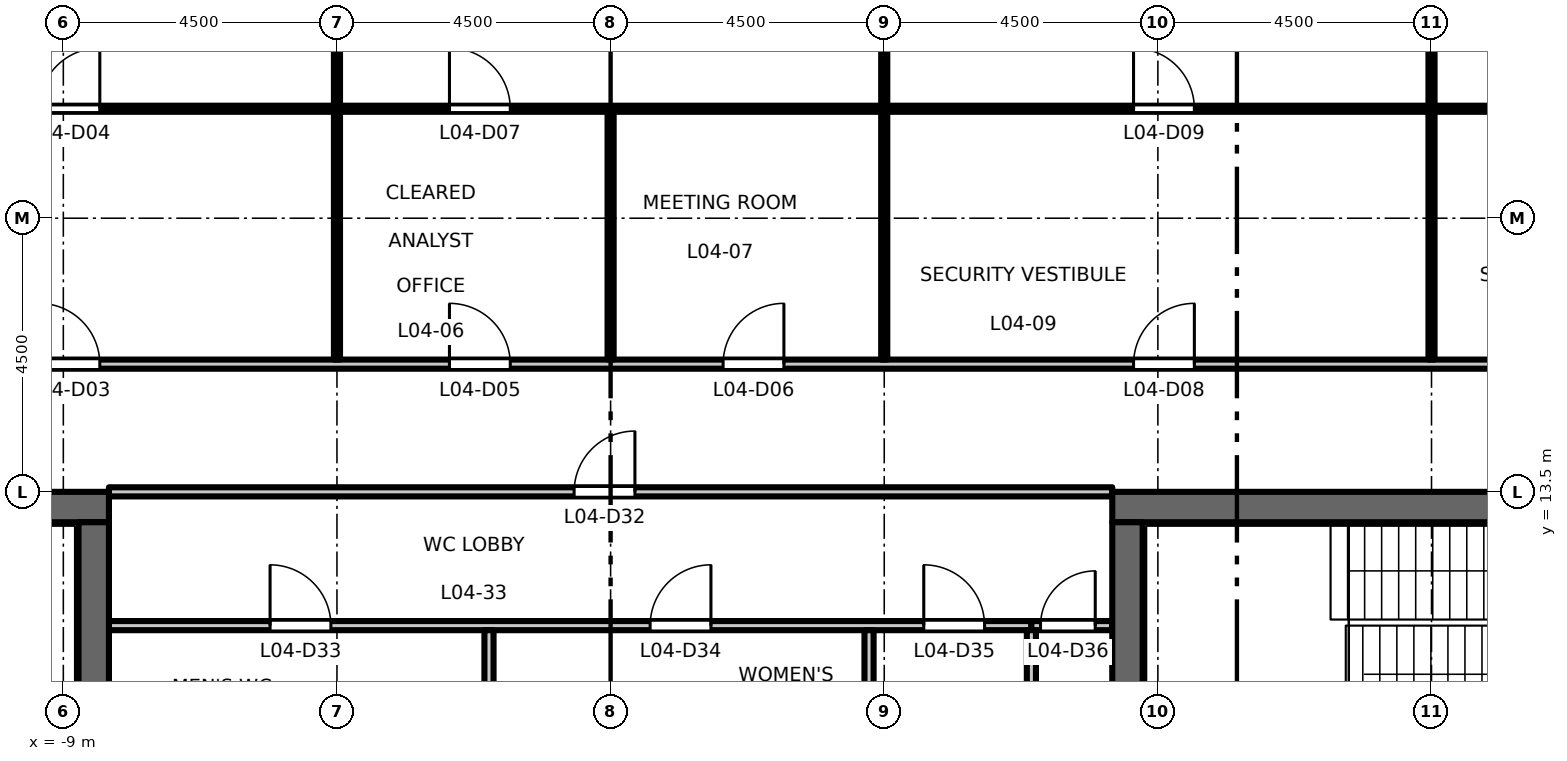
"""IFC4 building model, lengths in metres.
Left out: names, types, materials, properties, quantities, classifications, styles, units other than length and angle.
Written with IfcOpenShell. Run it as: python <this file> out.ifc"""

import sys

from ifc_helpers import new_model, si_unit, direction, frame, frame_2d, origin, place, context, subcontext, project, spatial, rectangle, extrude, element, fill, save


model = new_model("IFC4")
c1 = context("Model", 3, precision=1e-05, world=origin(), true_north=direction((0.0, 1.0)))
c2 = subcontext(c1, "Body", "Model", "MODEL_VIEW")
j1 = project(units=[si_unit("LENGTHUNIT", "METRE"), si_unit("PLANEANGLEUNIT", "RADIAN")], contexts=[c1])
p1 = place(None, origin())
s1 = spatial("IfcSite", under=j1, at=p1, CompositionType="ELEMENT")
p2 = place(p1, origin())
s2 = spatial("IfcBuilding", under=s1, at=p2, CompositionType="ELEMENT")
p3 = place(p2, frame((0.0, 0.0, 22.2)))
s3 = spatial("IfcBuildingStorey", under=s2, at=p3, CompositionType="ELEMENT", Elevation=22.2)
p4 = place(p3, frame((-8.25, 13.25, 0.0), z_axis=(0.0, 0.0, 1.0), x_axis=(-1.0, 0.0, 0.0)))
e1 = element("IfcWall", 1, at=p4, inside=s3, PredefinedType="SHEAR", context=c2, shape_type="SweptSolid", body=[
    extrude(rectangle(XDim=13.5, YDim=0.5, at=frame_2d((6.75, 0.0))), origin(), (0.0, 0.0, 1.0), 4.35),
])
p5 = place(p3, frame((-8.5, -13.0, 0.0), z_axis=(0.0, 0.0, 1.0), x_axis=(0.0, 1.0, 0.0)))
e2 = element("IfcWall", 2, at=p5, inside=s3, PredefinedType="SHEAR", context=c2, shape_type="SweptSolid", body=[
    extrude(rectangle(XDim=26.0, YDim=0.5, at=frame_2d((13.0, 0.0))), origin(), (0.0, 0.0, 1.0), 4.35),
])
p6 = place(p3, frame((8.25, 13.25, 0.0), z_axis=(0.0, 0.0, 1.0), x_axis=(1.0, 0.0, 0.0)))
e3 = element("IfcWall", 3, at=p6, inside=s3, PredefinedType="SHEAR", context=c2, shape_type="SweptSolid", body=[
    extrude(rectangle(XDim=13.5, YDim=0.5, at=frame_2d((6.75, 0.0))), origin(), (0.0, 0.0, 1.0), 4.35),
])
p7 = place(p3, frame((8.5, -13.0, 0.0), z_axis=(0.0, 0.0, 1.0), x_axis=(0.0, 1.0, 0.0)))
e4 = element("IfcWall", 4, at=p7, inside=s3, PredefinedType="SHEAR", context=c2, shape_type="SweptSolid", body=[
    extrude(rectangle(XDim=26.0, YDim=0.5, at=frame_2d((13.0, 0.0))), origin(), (0.0, 0.0, 1.0), 4.35),
])
p8 = place(p3, frame((-8.25, 11.3, 0.0), z_axis=(0.0, 0.0, 1.0), x_axis=(1.0, 0.0, 0.0)))
e5 = element("IfcWall", 5, at=p8, inside=s3, PredefinedType="PARTITIONING", context=c2, shape_type="SweptSolid", body=[
    extrude(rectangle(XDim=15.17, YDim=0.15, at=frame_2d((7.585, 0.0))), origin(), (0.0, 0.0, 1.0), 4.35),
])
p9 = place(p8, frame((2.65, 0.0, 0.0)))
e6 = element("IfcOpeningElement", 6, at=p9, cuts=e5, PredefinedType="OPENING", context=c2, shape_type="SweptSolid", body=[
    extrude(rectangle(XDim=1.0, YDim=2.1, at=frame_2d((0.5, 1.05))), frame((0.0, 0.085, 0.0), z_axis=(0.0, -1.0, 0.0), x_axis=(1.0, 0.0, 0.0)), (0.0, 0.0, 1.0), 0.17),
])
p10 = place(p8, frame((8.9, 0.0, 0.0)))
e7 = element("IfcOpeningElement", 7, at=p10, cuts=e5, PredefinedType="OPENING", context=c2, shape_type="SweptSolid", body=[
    extrude(rectangle(XDim=1.0, YDim=2.1, at=frame_2d((0.5, 1.05))), frame((0.0, 0.085, 0.0), z_axis=(0.0, -1.0, 0.0), x_axis=(1.0, 0.0, 0.0)), (0.0, 0.0, 1.0), 0.17),
])
p11 = place(p8, frame((13.4, 0.0, 0.0)))
e8 = element("IfcOpeningElement", 8, at=p11, cuts=e5, PredefinedType="OPENING", context=c2, shape_type="SweptSolid", body=[
    extrude(rectangle(XDim=1.0, YDim=2.1, at=frame_2d((0.5, 1.05))), frame((0.0, 0.085, 0.0), z_axis=(0.0, -1.0, 0.0), x_axis=(1.0, 0.0, 0.0)), (0.0, 0.0, 1.0), 0.17),
])
p12 = place(p3, frame((6.92, 11.3, 0.0), z_axis=(0.0, 0.0, 1.0), x_axis=(1.0, 0.0, 0.0)))
e9 = element("IfcWall", 9, at=p12, inside=s3, PredefinedType="PARTITIONING", context=c2, shape_type="SweptSolid", body=[
    extrude(rectangle(XDim=1.33, YDim=0.15, at=frame_2d((0.665, 0.0))), origin(), (0.0, 0.0, 1.0), 4.35),
])
p13 = place(p12, frame((0.15, 0.0, 0.0)))
e10 = element("IfcOpeningElement", 10, at=p13, cuts=e9, PredefinedType="OPENING", context=c2, shape_type="SweptSolid", body=[
    extrude(rectangle(XDim=0.9, YDim=2.1, at=frame_2d((0.45, 1.05))), frame((0.0, 0.085, 0.0), z_axis=(0.0, -1.0, 0.0), x_axis=(1.0, 0.0, 0.0)), (0.0, 0.0, 1.0), 0.17),
])
p14 = place(p3, frame((-8.25, 13.5, 0.0), z_axis=(0.0, 0.0, 1.0), x_axis=(1.0, 0.0, 0.0)))
e11 = element("IfcWall", 11, at=p14, inside=s3, PredefinedType="PARTITIONING", context=c2, shape_type="SweptSolid", body=[
    extrude(rectangle(XDim=16.5, YDim=0.15, at=frame_2d((8.25, 0.0))), origin(), (0.0, 0.0, 1.0), 3.85),
])
p15 = place(p14, frame((7.65, 0.0, 0.0)))
e12 = element("IfcOpeningElement", 12, at=p15, cuts=e11, PredefinedType="OPENING", context=c2, shape_type="SweptSolid", body=[
    extrude(rectangle(XDim=1.0, YDim=2.1, at=frame_2d((0.5, 1.05))), frame((0.0, 0.085, 0.0), z_axis=(0.0, -1.0, 0.0), x_axis=(1.0, 0.0, 0.0)), (0.0, 0.0, 1.0), 0.17),
])
p16 = place(p3, frame((-30.51, 15.6, 0.0), z_axis=(0.0, 0.0, 1.0), x_axis=(1.0, 0.0, 0.0)))
e13 = element("IfcWall", 13, at=p16, inside=s3, PredefinedType="PARTITIONING", context=c2, shape_type="SweptSolid", body=[
    extrude(rectangle(XDim=61.02, YDim=0.15, at=frame_2d((30.51, 0.0))), origin(), (0.0, 0.0, 1.0), 4.35),
])
p17 = place(p16, frame((12.11, 0.0, 0.0)))
e14 = element("IfcOpeningElement", 14, at=p17, cuts=e13, PredefinedType="OPENING", context=c2, shape_type="SweptSolid", body=[
    extrude(rectangle(XDim=1.0, YDim=2.1, at=frame_2d((0.5, 1.05))), frame((0.0, 0.085, 0.0), z_axis=(0.0, -1.0, 0.0), x_axis=(1.0, 0.0, 0.0)), (0.0, 0.0, 1.0), 0.17),
])
p18 = place(p16, frame((21.11, 0.0, 0.0)))
e15 = element("IfcOpeningElement", 15, at=p18, cuts=e13, PredefinedType="OPENING", context=c2, shape_type="SweptSolid", body=[
    extrude(rectangle(XDim=1.0, YDim=2.1, at=frame_2d((0.5, 1.05))), frame((0.0, 0.085, 0.0), z_axis=(0.0, -1.0, 0.0), x_axis=(1.0, 0.0, 0.0)), (0.0, 0.0, 1.0), 0.17),
])
p19 = place(p16, frame((27.86, 0.0, 0.0)))
e16 = element("IfcOpeningElement", 16, at=p19, cuts=e13, PredefinedType="OPENING", context=c2, shape_type="SweptSolid", body=[
    extrude(rectangle(XDim=1.0, YDim=2.1, at=frame_2d((0.5, 1.05))), frame((0.0, 0.085, 0.0), z_axis=(0.0, -1.0, 0.0), x_axis=(1.0, 0.0, 0.0)), (0.0, 0.0, 1.0), 0.17),
])
p20 = place(p16, frame((32.36, 0.0, 0.0)))
e17 = element("IfcOpeningElement", 17, at=p20, cuts=e13, PredefinedType="OPENING", context=c2, shape_type="SweptSolid", body=[
    extrude(rectangle(XDim=1.0, YDim=2.1, at=frame_2d((0.5, 1.05))), frame((0.0, 0.085, 0.0), z_axis=(0.0, -1.0, 0.0), x_axis=(1.0, 0.0, 0.0)), (0.0, 0.0, 1.0), 0.17),
])
p21 = place(p16, frame((39.11, 0.0, 0.0)))
e18 = element("IfcOpeningElement", 18, at=p21, cuts=e13, PredefinedType="OPENING", context=c2, shape_type="SweptSolid", body=[
    extrude(rectangle(XDim=1.0, YDim=2.1, at=frame_2d((0.5, 1.05))), frame((0.0, 0.085, 0.0), z_axis=(0.0, -1.0, 0.0), x_axis=(1.0, 0.0, 0.0)), (0.0, 0.0, 1.0), 0.17),
])
p22 = place(p16, frame((48.11, 0.0, 0.0)))
e19 = element("IfcOpeningElement", 19, at=p22, cuts=e13, PredefinedType="OPENING", context=c2, shape_type="SweptSolid", body=[
    extrude(rectangle(XDim=1.0, YDim=2.1, at=frame_2d((0.5, 1.05))), frame((0.0, 0.085, 0.0), z_axis=(0.0, -1.0, 0.0), x_axis=(1.0, 0.0, 0.0)), (0.0, 0.0, 1.0), 0.17),
])
p23 = place(p16, frame((3.61, 0.0, 0.0)))
e20 = element("IfcOpeningElement", 20, at=p23, cuts=e13, PredefinedType="OPENING", context=c2, shape_type="SweptSolid", body=[
    extrude(rectangle(XDim=1.0, YDim=2.1, at=frame_2d((0.5, 1.05))), frame((0.0, 0.085, 0.0), z_axis=(0.0, -1.0, 0.0), x_axis=(1.0, 0.0, 0.0)), (0.0, 0.0, 1.0), 0.17),
])
p24 = place(p16, frame((56.62, 0.0, 0.0)))
e21 = element("IfcOpeningElement", 21, at=p24, cuts=e13, PredefinedType="OPENING", context=c2, shape_type="SweptSolid", body=[
    extrude(rectangle(XDim=1.0, YDim=2.1, at=frame_2d((0.5, 1.05))), frame((0.0, 0.085, 0.0), z_axis=(0.0, -1.0, 0.0), x_axis=(1.0, 0.0, 0.0)), (0.0, 0.0, 1.0), 0.17),
])
p25 = place(p3, frame((-30.51, 19.8, 0.0), z_axis=(0.0, 0.0, 1.0), x_axis=(1.0, 0.0, 0.0)))
e22 = element("IfcWall", 22, at=p25, inside=s3, PredefinedType="PARTITIONING", context=c2, shape_type="SweptSolid", body=[
    extrude(rectangle(XDim=61.02, YDim=0.1, at=frame_2d((30.51, 0.0))), origin(), (0.0, 0.0, 1.0), 4.35),
])
p26 = place(p25, frame((12.11, 0.0, 0.0)))
e23 = element("IfcOpeningElement", 23, at=p26, cuts=e22, PredefinedType="OPENING", context=c2, shape_type="SweptSolid", body=[
    extrude(rectangle(XDim=1.0, YDim=2.1, at=frame_2d((0.5, 1.05))), frame((0.0, 0.06, 0.0), z_axis=(0.0, -1.0, 0.0), x_axis=(1.0, 0.0, 0.0)), (0.0, 0.0, 1.0), 0.12),
])
p27 = place(p25, frame((21.11, 0.0, 0.0)))
e24 = element("IfcOpeningElement", 24, at=p27, cuts=e22, PredefinedType="OPENING", context=c2, shape_type="SweptSolid", body=[
    extrude(rectangle(XDim=1.0, YDim=2.1, at=frame_2d((0.5, 1.05))), frame((0.0, 0.06, 0.0), z_axis=(0.0, -1.0, 0.0), x_axis=(1.0, 0.0, 0.0)), (0.0, 0.0, 1.0), 0.12),
])
p28 = place(p25, frame((27.86, 0.0, 0.0)))
e25 = element("IfcOpeningElement", 25, at=p28, cuts=e22, PredefinedType="OPENING", context=c2, shape_type="SweptSolid", body=[
    extrude(rectangle(XDim=1.0, YDim=2.1, at=frame_2d((0.5, 1.05))), frame((0.0, 0.06, 0.0), z_axis=(0.0, -1.0, 0.0), x_axis=(1.0, 0.0, 0.0)), (0.0, 0.0, 1.0), 0.12),
])
p29 = place(p25, frame((39.11, 0.0, 0.0)))
e26 = element("IfcOpeningElement", 26, at=p29, cuts=e22, PredefinedType="OPENING", context=c2, shape_type="SweptSolid", body=[
    extrude(rectangle(XDim=1.0, YDim=2.1, at=frame_2d((0.5, 1.05))), frame((0.0, 0.06, 0.0), z_axis=(0.0, -1.0, 0.0), x_axis=(1.0, 0.0, 0.0)), (0.0, 0.0, 1.0), 0.12),
])
p30 = place(p25, frame((48.11, 0.0, 0.0)))
e27 = element("IfcOpeningElement", 27, at=p30, cuts=e22, PredefinedType="OPENING", context=c2, shape_type="SweptSolid", body=[
    extrude(rectangle(XDim=1.0, YDim=2.1, at=frame_2d((0.5, 1.05))), frame((0.0, 0.06, 0.0), z_axis=(0.0, -1.0, 0.0), x_axis=(1.0, 0.0, 0.0)), (0.0, 0.0, 1.0), 0.12),
])
p31 = place(p25, frame((3.61, 0.0, 0.0)))
e28 = element("IfcOpeningElement", 28, at=p31, cuts=e22, PredefinedType="OPENING", context=c2, shape_type="SweptSolid", body=[
    extrude(rectangle(XDim=1.0, YDim=2.1, at=frame_2d((0.5, 1.05))), frame((0.0, 0.06, 0.0), z_axis=(0.0, -1.0, 0.0), x_axis=(1.0, 0.0, 0.0)), (0.0, 0.0, 1.0), 0.12),
])
p32 = place(p25, frame((56.62, 0.0, 0.0)))
e29 = element("IfcOpeningElement", 29, at=p32, cuts=e22, PredefinedType="OPENING", context=c2, shape_type="SweptSolid", body=[
    extrude(rectangle(XDim=1.0, YDim=2.1, at=frame_2d((0.5, 1.05))), frame((0.0, 0.06, 0.0), z_axis=(0.0, -1.0, 0.0), x_axis=(1.0, 0.0, 0.0)), (0.0, 0.0, 1.0), 0.12),
])
p33 = place(p3, frame((-4.5, 15.675, 0.0), z_axis=(0.0, 0.0, 1.0), x_axis=(0.0, 1.0, 0.0)))
e30 = element("IfcWall", 30, at=p33, inside=s3, PredefinedType="PARTITIONING", context=c2, shape_type="SweptSolid", body=[
    extrude(rectangle(XDim=4.075, YDim=0.1, at=frame_2d((2.038, 0.0))), origin(), (0.0, 0.0, 1.0), 3.35),
])
p34 = place(p3, frame((-4.5, 19.85, 0.0), z_axis=(0.0, 0.0, 1.0), x_axis=(0.0, 1.0, 0.0)))
e31 = element("IfcWall", 31, at=p34, inside=s3, PredefinedType="PARTITIONING", context=c2, shape_type="SweptSolid", body=[
    extrude(rectangle(XDim=10.66, YDim=0.1, at=frame_2d((5.33, 0.0))), origin(), (0.0, 0.0, 1.0), 3.35),
])
p35 = place(p3, frame((-2.0, 8.37, 0.0), z_axis=(0.0, 0.0, 1.0), x_axis=(0.0, 1.0, 0.0)))
e32 = element("IfcWall", 32, at=p35, inside=s3, PredefinedType="PARTITIONING", context=c2, shape_type="SweptSolid", body=[
    extrude(rectangle(XDim=2.855, YDim=0.15, at=frame_2d((1.427, 0.0))), origin(), (0.0, 0.0, 1.0), 4.35),
])
p36 = place(p3, frame((0.0, 15.675, 0.0), z_axis=(0.0, 0.0, 1.0), x_axis=(0.0, 1.0, 0.0)))
e33 = element("IfcWall", 33, at=p36, inside=s3, PredefinedType="PARTITIONING", context=c2, shape_type="SweptSolid", body=[
    extrude(rectangle(XDim=4.075, YDim=0.1, at=frame_2d((2.038, 0.0))), origin(), (0.0, 0.0, 1.0), 4.35),
])
p37 = place(p3, frame((4.25, 8.37, 0.0), z_axis=(0.0, 0.0, 1.0), x_axis=(0.0, 1.0, 0.0)))
e34 = element("IfcWall", 34, at=p37, inside=s3, PredefinedType="PARTITIONING", context=c2, shape_type="SweptSolid", body=[
    extrude(rectangle(XDim=2.855, YDim=0.15, at=frame_2d((1.427, 0.0))), origin(), (0.0, 0.0, 1.0), 4.35),
])
p38 = place(p3, frame((4.5, 15.675, 0.0), z_axis=(0.0, 0.0, 1.0), x_axis=(0.0, 1.0, 0.0)))
e35 = element("IfcWall", 35, at=p38, inside=s3, PredefinedType="PARTITIONING", context=c2, shape_type="SweptSolid", body=[
    extrude(rectangle(XDim=4.075, YDim=0.1, at=frame_2d((2.038, 0.0))), origin(), (0.0, 0.0, 1.0), 3.35),
])
p39 = place(p3, frame((4.5, 19.85, 0.0), z_axis=(0.0, 0.0, 1.0), x_axis=(0.0, 1.0, 0.0)))
e36 = element("IfcWall", 36, at=p39, inside=s3, PredefinedType="PARTITIONING", context=c2, shape_type="SweptSolid", body=[
    extrude(rectangle(XDim=10.66, YDim=0.1, at=frame_2d((5.33, 0.0))), origin(), (0.0, 0.0, 1.0), 3.35),
])
p40 = place(p3, frame((6.92, 8.028, 0.0), z_axis=(0.0, 0.0, 1.0), x_axis=(0.0, 1.0, 0.0)))
e37 = element("IfcWall", 37, at=p40, inside=s3, PredefinedType="PARTITIONING", context=c2, shape_type="SweptSolid", body=[
    extrude(rectangle(XDim=3.197, YDim=0.15, at=frame_2d((1.599, 0.0))), origin(), (0.0, 0.0, 1.0), 4.35),
])
p41 = place(p3, frame((13.5, 15.675, 0.0), z_axis=(0.0, 0.0, 1.0), x_axis=(0.0, 1.0, 0.0)))
e38 = element("IfcWall", 38, at=p41, inside=s3, PredefinedType="PARTITIONING", context=c2, shape_type="SweptSolid", body=[
    extrude(rectangle(XDim=4.075, YDim=0.1, at=frame_2d((2.038, 0.0))), origin(), (0.0, 0.0, 1.0), 3.35),
])
p42 = place(p3, frame((13.5, 19.85, 0.0), z_axis=(0.0, 0.0, 1.0), x_axis=(0.0, 1.0, 0.0)))
e39 = element("IfcWall", 39, at=p42, inside=s3, PredefinedType="PARTITIONING", context=c2, shape_type="SweptSolid", body=[
    extrude(rectangle(XDim=10.66, YDim=0.1, at=frame_2d((5.33, 0.0))), origin(), (0.0, 0.0, 1.0), 3.35),
])
p43 = place(p18, origin())
e40 = element("IfcDoor", 40, at=p43, inside=s3, OperationType="SINGLE_SWING_LEFT", PredefinedType="DOOR", context=c2, shape_type="SweptSolid", body=[
    extrude(rectangle(XDim=1.0, YDim=2.1, at=frame_2d((0.5, 1.05))), frame((0.0, 0.025, 0.0), z_axis=(0.0, -1.0, 0.0), x_axis=(1.0, 0.0, 0.0)), (0.0, 0.0, 1.0), 0.05),
])
fill(e15, e40)
p44 = place(p27, origin())
e41 = element("IfcDoor", 41, at=p44, inside=s3, OperationType="SINGLE_SWING_RIGHT", PredefinedType="DOOR", context=c2, shape_type="SweptSolid", body=[
    extrude(rectangle(XDim=1.0, YDim=2.1, at=frame_2d((0.5, 1.05))), frame((0.0, 0.025, 0.0), z_axis=(0.0, -1.0, 0.0), x_axis=(1.0, 0.0, 0.0)), (0.0, 0.0, 1.0), 0.05),
])
fill(e24, e41)
p45 = place(p19, origin())
e42 = element("IfcDoor", 42, at=p45, inside=s3, OperationType="SINGLE_SWING_LEFT", PredefinedType="DOOR", context=c2, shape_type="SweptSolid", body=[
    extrude(rectangle(XDim=1.0, YDim=2.1, at=frame_2d((0.5, 1.05))), frame((0.0, 0.025, 0.0), z_axis=(0.0, -1.0, 0.0), x_axis=(1.0, 0.0, 0.0)), (0.0, 0.0, 1.0), 0.05),
])
fill(e16, e42)
p46 = place(p20, origin())
e43 = element("IfcDoor", 43, at=p46, inside=s3, OperationType="SINGLE_SWING_RIGHT", PredefinedType="DOOR", context=c2, shape_type="SweptSolid", body=[
    extrude(rectangle(XDim=1.0, YDim=2.1, at=frame_2d((0.5, 1.05))), frame((0.0, 0.025, 0.0), z_axis=(0.0, -1.0, 0.0), x_axis=(1.0, 0.0, 0.0)), (0.0, 0.0, 1.0), 0.05),
])
fill(e17, e43)
p47 = place(p28, origin())
e44 = element("IfcDoor", 44, at=p47, inside=s3, OperationType="SINGLE_SWING_LEFT", PredefinedType="DOOR", context=c2, shape_type="SweptSolid", body=[
    extrude(rectangle(XDim=1.0, YDim=2.1, at=frame_2d((0.5, 1.05))), frame((0.0, 0.025, 0.0), z_axis=(0.0, -1.0, 0.0), x_axis=(1.0, 0.0, 0.0)), (0.0, 0.0, 1.0), 0.05),
])
fill(e25, e44)
p48 = place(p21, origin())
e45 = element("IfcDoor", 45, at=p48, inside=s3, OperationType="SINGLE_SWING_RIGHT", PredefinedType="DOOR", context=c2, shape_type="SweptSolid", body=[
    extrude(rectangle(XDim=1.0, YDim=2.1, at=frame_2d((0.5, 1.05))), frame((0.0, 0.025, 0.0), z_axis=(0.0, -1.0, 0.0), x_axis=(1.0, 0.0, 0.0)), (0.0, 0.0, 1.0), 0.05),
])
fill(e18, e45)
p49 = place(p29, origin())
e46 = element("IfcDoor", 46, at=p49, inside=s3, OperationType="SINGLE_SWING_LEFT", PredefinedType="DOOR", context=c2, shape_type="SweptSolid", body=[
    extrude(rectangle(XDim=1.0, YDim=2.1, at=frame_2d((0.5, 1.05))), frame((0.0, 0.025, 0.0), z_axis=(0.0, -1.0, 0.0), x_axis=(1.0, 0.0, 0.0)), (0.0, 0.0, 1.0), 0.05),
])
fill(e26, e46)
p50 = place(p15, origin())
e47 = element("IfcDoor", 47, at=p50, inside=s3, OperationType="SINGLE_SWING_RIGHT", PredefinedType="DOOR", context=c2, shape_type="SweptSolid", body=[
    extrude(rectangle(XDim=1.0, YDim=2.1, at=frame_2d((0.5, 1.05))), frame((0.0, 0.025, 0.0), z_axis=(0.0, -1.0, 0.0), x_axis=(1.0, 0.0, 0.0)), (0.0, 0.0, 1.0), 0.05),
])
fill(e12, e47)
p51 = place(p9, origin())
e48 = element("IfcDoor", 48, at=p51, inside=s3, OperationType="SINGLE_SWING_LEFT", PredefinedType="DOOR", context=c2, shape_type="SweptSolid", body=[
    extrude(rectangle(XDim=1.0, YDim=2.1, at=frame_2d((0.5, 1.05))), frame((0.0, 0.025, 0.0), z_axis=(0.0, -1.0, 0.0), x_axis=(1.0, 0.0, 0.0)), (0.0, 0.0, 1.0), 0.05),
])
fill(e6, e48)
p52 = place(p10, origin())
e49 = element("IfcDoor", 49, at=p52, inside=s3, OperationType="SINGLE_SWING_RIGHT", PredefinedType="DOOR", context=c2, shape_type="SweptSolid", body=[
    extrude(rectangle(XDim=1.0, YDim=2.1, at=frame_2d((0.5, 1.05))), frame((0.0, 0.025, 0.0), z_axis=(0.0, -1.0, 0.0), x_axis=(1.0, 0.0, 0.0)), (0.0, 0.0, 1.0), 0.05),
])
fill(e7, e49)
p53 = place(p11, origin())
e50 = element("IfcDoor", 50, at=p53, inside=s3, OperationType="SINGLE_SWING_LEFT", PredefinedType="DOOR", context=c2, shape_type="SweptSolid", body=[
    extrude(rectangle(XDim=1.0, YDim=2.1, at=frame_2d((0.5, 1.05))), frame((0.0, 0.025, 0.0), z_axis=(0.0, -1.0, 0.0), x_axis=(1.0, 0.0, 0.0)), (0.0, 0.0, 1.0), 0.05),
])
fill(e8, e50)
p54 = place(p13, origin())
e51 = element("IfcDoor", 51, at=p54, inside=s3, OperationType="SINGLE_SWING_RIGHT", PredefinedType="DOOR", context=c2, shape_type="SweptSolid", body=[
    extrude(rectangle(XDim=0.9, YDim=2.1, at=frame_2d((0.45, 1.05))), frame((0.0, 0.025, 0.0), z_axis=(0.0, -1.0, 0.0), x_axis=(1.0, 0.0, 0.0)), (0.0, 0.0, 1.0), 0.05),
])
fill(e10, e51)
save(model, sys.argv[1])
